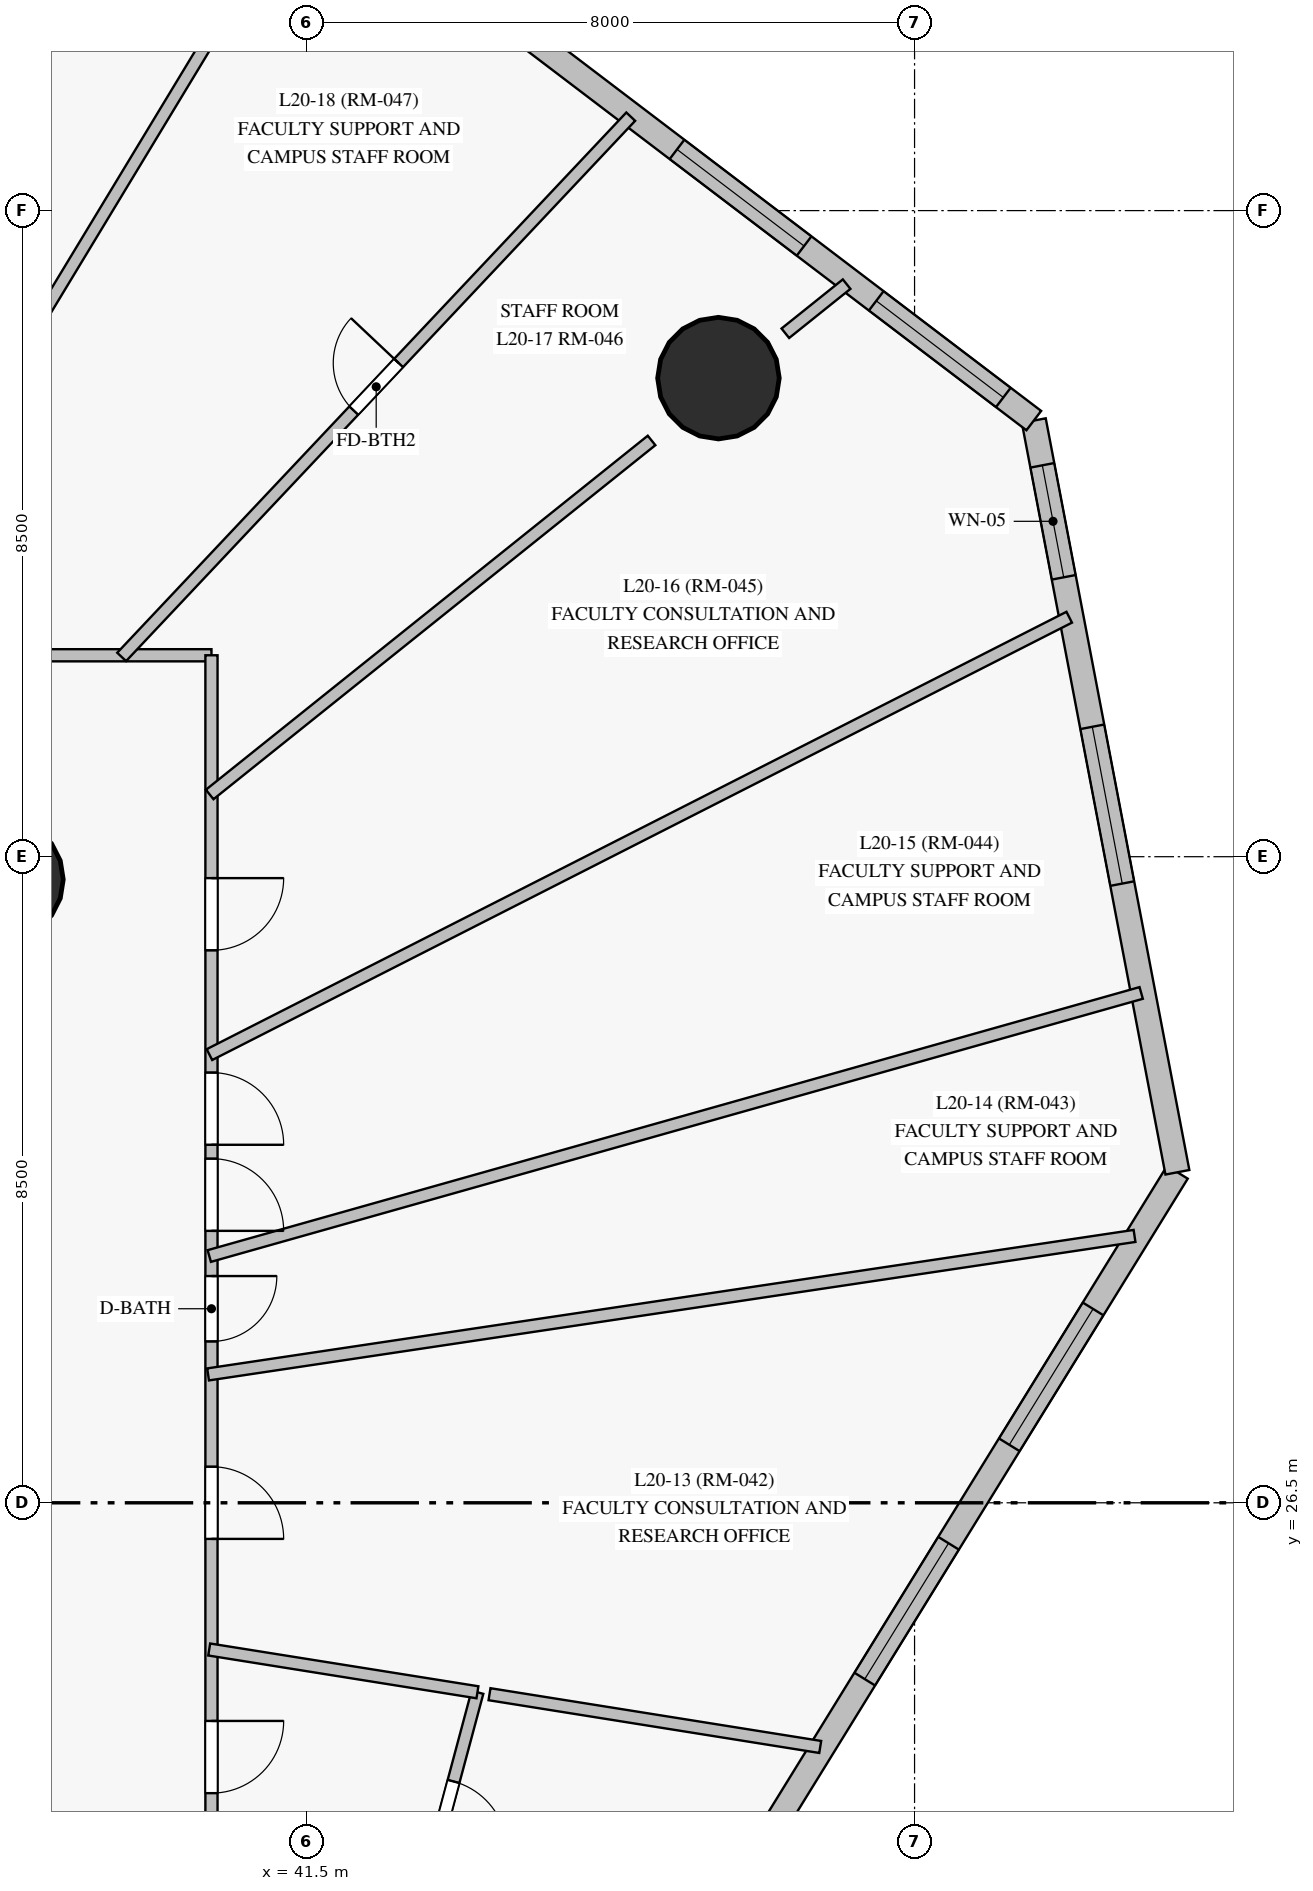
"""IFC4 building model, lengths in metres.
Left out: names, types, materials, properties, quantities, classifications, styles, units other than length and angle.
Written with IfcOpenShell. Run it as: python <this file> out.ifc"""

import sys

from ifc_helpers import new_model, si_unit, direction, frame, frame_2d, origin, origin_with_axes, origin_2d, place, context, subcontext, project, spatial, rectangle, circle, extrude, source, transform, mapped, element, fill, save


model = new_model("IFC4")
c1 = context("Model", 3, precision=1e-05, world=origin(), true_north=direction((0.0, 1.0)))
c2 = subcontext(c1, "Body", "Model", "MODEL_VIEW")
j1 = project(units=[si_unit("LENGTHUNIT", "METRE"), si_unit("PLANEANGLEUNIT", "RADIAN")], contexts=[c1])
p1 = place(None, origin())
s1 = spatial("IfcSite", under=j1, at=p1, CompositionType="ELEMENT")
p2 = place(p1, origin())
s2 = spatial("IfcBuilding", under=s1, at=p2, CompositionType="ELEMENT")
p3 = place(p2, frame((0.0, 0.0, 76.9)))
s3 = spatial("IfcBuildingStorey", under=s2, at=p3, CompositionType="ELEMENT", Elevation=76.9)
m1 = source(origin_with_axes(), c2, "Body", "SweptSolid", [
    extrude(circle(Radius=0.8, at=origin_2d()), origin(), (0.0, 0.0, 1.0), 3.6),
])
for number, where, z_axis, x_axis in (
    (1, (37.5, 34.7, 0.0), (0.0, 0.0, 1.0), (1.0, 0.0, 0.0)),
    (2, (46.92, 41.296, 0.0), (0.0, 0.0, 1.0), (1.0, 0.0, 0.0)),
):
    element("IfcColumn", number, at=place(p3, frame(where, z_axis=z_axis, x_axis=x_axis)), inside=s3, PredefinedType="COLUMN", context=c2, shape_type="MappedRepresentation", body=[
        mapped(m1, transform((0.0, 0.0, 0.0), scale=1.0)),
    ])
p4 = place(p3, frame((45.043, 18.018, 0.0), z_axis=(0.0, 0.0, 1.0), x_axis=(0.525018733496, 0.851090670539, 0.0)))
e3 = element("IfcWall", 3, at=p4, inside=s3, PredefinedType="SOLIDWALL", context=c2, shape_type="SweptSolid", body=[
    extrude(rectangle(XDim=15.076, YDim=0.32, at=frame_2d((7.538, 0.0))), origin(), (0.0, 0.0, 1.0), 3.35),
])
p5 = place(p4, frame((2.06, 0.0, 0.85)))
e4 = element("IfcOpeningElement", 4, at=p5, cuts=e3, PredefinedType="OPENING", context=c2, shape_type="SweptSolid", body=[
    extrude(rectangle(XDim=2.1, YDim=1.95, at=frame_2d((1.05, 0.975))), frame((0.0, 0.17, 0.0), z_axis=(0.0, -1.0, 0.0), x_axis=(1.0, 0.0, 0.0)), (0.0, 0.0, 1.0), 0.34),
])
p6 = place(p4, frame((7.241, 0.0, 0.85)))
e5 = element("IfcOpeningElement", 5, at=p6, cuts=e3, PredefinedType="OPENING", context=c2, shape_type="SweptSolid", body=[
    extrude(rectangle(XDim=2.1, YDim=1.95, at=frame_2d((1.05, 0.975))), frame((0.0, 0.17, 0.0), z_axis=(0.0, -1.0, 0.0), x_axis=(1.0, 0.0, 0.0)), (0.0, 0.0, 1.0), 0.34),
])
p7 = place(p4, frame((10.863, 0.0, 0.85)))
e6 = element("IfcOpeningElement", 6, at=p7, cuts=e3, PredefinedType="OPENING", context=c2, shape_type="SweptSolid", body=[
    extrude(rectangle(XDim=2.1, YDim=1.95, at=frame_2d((1.05, 0.975))), frame((0.0, 0.17, 0.0), z_axis=(0.0, -1.0, 0.0), x_axis=(1.0, 0.0, 0.0)), (0.0, 0.0, 1.0), 0.34),
])
p8 = place(p3, frame((52.958, 30.848, 0.0), z_axis=(0.0, 0.0, 1.0), x_axis=(-0.187668122097, 0.982232495873, 0.0)))
e7 = element("IfcWall", 7, at=p8, inside=s3, PredefinedType="SOLIDWALL", context=c2, shape_type="SweptSolid", body=[
    extrude(rectangle(XDim=10.068, YDim=0.32, at=frame_2d((5.034, 0.0))), origin(), (0.0, 0.0, 1.0), 3.35),
])
p9 = place(p8, frame((3.867, 0.0, 0.85)))
e8 = element("IfcOpeningElement", 8, at=p9, cuts=e7, PredefinedType="OPENING", context=c2, shape_type="SweptSolid", body=[
    extrude(rectangle(XDim=2.1, YDim=1.95, at=frame_2d((1.05, 0.975))), frame((0.0, 0.17, 0.0), z_axis=(0.0, -1.0, 0.0), x_axis=(1.0, 0.0, 0.0)), (0.0, 0.0, 1.0), 0.34),
])
p10 = place(p8, frame((7.969, 0.0, 0.85)))
e9 = element("IfcOpeningElement", 9, at=p10, cuts=e7, PredefinedType="OPENING", context=c2, shape_type="SweptSolid", body=[
    extrude(rectangle(XDim=1.5, YDim=1.85, at=frame_2d((0.75, 0.925))), frame((0.0, 0.17, 0.0), z_axis=(0.0, -1.0, 0.0), x_axis=(1.0, 0.0, 0.0)), (0.0, 0.0, 1.0), 0.34),
])
p11 = place(p3, frame((51.069, 40.737, 0.0), z_axis=(0.0, 0.0, 1.0), x_axis=(-0.796119452113, 0.605139502898, 0.0)))
e10 = element("IfcWall", 10, at=p11, inside=s3, PredefinedType="SOLIDWALL", context=c2, shape_type="SweptSolid", body=[
    extrude(rectangle(XDim=12.548, YDim=0.32, at=frame_2d((6.274, 0.0))), origin(), (0.0, 0.0, 1.0), 3.35),
])
p12 = place(p11, frame((0.503, 0.0, 0.85)))
e11 = element("IfcOpeningElement", 11, at=p12, cuts=e10, PredefinedType="OPENING", context=c2, shape_type="SweptSolid", body=[
    extrude(rectangle(XDim=2.1, YDim=1.95, at=frame_2d((1.05, 0.975))), frame((0.0, 0.17, 0.0), z_axis=(0.0, -1.0, 0.0), x_axis=(1.0, 0.0, 0.0)), (0.0, 0.0, 1.0), 0.34),
])
p13 = place(p11, frame((3.796, 0.0, 0.85)))
e12 = element("IfcOpeningElement", 12, at=p13, cuts=e10, PredefinedType="OPENING", context=c2, shape_type="SweptSolid", body=[
    extrude(rectangle(XDim=2.1, YDim=1.95, at=frame_2d((1.05, 0.975))), frame((0.0, 0.17, 0.0), z_axis=(0.0, -1.0, 0.0), x_axis=(1.0, 0.0, 0.0)), (0.0, 0.0, 1.0), 0.34),
])
p14 = place(p11, frame((8.241, 0.0, 0.85)))
e13 = element("IfcOpeningElement", 13, at=p14, cuts=e10, PredefinedType="OPENING", context=c2, shape_type="SweptSolid", body=[
    extrude(rectangle(XDim=2.1, YDim=1.95, at=frame_2d((1.05, 0.975))), frame((0.0, 0.17, 0.0), z_axis=(0.0, -1.0, 0.0), x_axis=(1.0, 0.0, 0.0)), (0.0, 0.0, 1.0), 0.34),
])
p15 = place(p3, frame((10.5, 37.65, 0.0), z_axis=(0.0, 0.0, 1.0), x_axis=(1.0, 0.0, 0.0)))
e14 = element("IfcWall", 14, at=p15, inside=s3, PredefinedType="PARTITIONING", context=c2, shape_type="SweptSolid", body=[
    extrude(rectangle(XDim=29.75, YDim=0.16, at=frame_2d((14.875, 0.0))), origin(), (0.0, 0.0, 1.0), 2.75),
])
p16 = place(p15, frame((26.208, 0.0, 0.0)))
e15 = element("IfcOpeningElement", 15, at=p16, cuts=e14, PredefinedType="OPENING", context=c2, shape_type="SweptSolid", body=[
    extrude(rectangle(XDim=0.95, YDim=2.15, at=frame_2d((0.475, 1.075))), frame((0.0, 0.09, 0.0), z_axis=(0.0, -1.0, 0.0), x_axis=(1.0, 0.0, 0.0)), (0.0, 0.0, 1.0), 0.18),
])
p17 = place(p15, frame((23.495, 0.0, 0.0)))
e16 = element("IfcOpeningElement", 16, at=p17, cuts=e14, PredefinedType="OPENING", context=c2, shape_type="SweptSolid", body=[
    extrude(rectangle(XDim=0.95, YDim=2.15, at=frame_2d((0.475, 1.075))), frame((0.0, 0.09, 0.0), z_axis=(0.0, -1.0, 0.0), x_axis=(1.0, 0.0, 0.0)), (0.0, 0.0, 1.0), 0.18),
])
p18 = place(p15, frame((14.4, 0.0, 0.0)))
e17 = element("IfcOpeningElement", 17, at=p18, cuts=e14, PredefinedType="OPENING", context=c2, shape_type="SweptSolid", body=[
    extrude(rectangle(XDim=0.95, YDim=2.15, at=frame_2d((0.475, 1.075))), frame((0.0, 0.09, 0.0), z_axis=(0.0, -1.0, 0.0), x_axis=(1.0, 0.0, 0.0)), (0.0, 0.0, 1.0), 0.18),
])
p19 = place(p15, frame((9.938, 0.0, 0.0)))
e18 = element("IfcOpeningElement", 18, at=p19, cuts=e14, PredefinedType="OPENING", context=c2, shape_type="SweptSolid", body=[
    extrude(rectangle(XDim=0.95, YDim=2.15, at=frame_2d((0.475, 1.075))), frame((0.0, 0.09, 0.0), z_axis=(0.0, -1.0, 0.0), x_axis=(1.0, 0.0, 0.0)), (0.0, 0.0, 1.0), 0.18),
])
p20 = place(p15, frame((6.962, 0.0, 0.0)))
e19 = element("IfcOpeningElement", 19, at=p20, cuts=e14, PredefinedType="OPENING", context=c2, shape_type="SweptSolid", body=[
    extrude(rectangle(XDim=0.95, YDim=2.15, at=frame_2d((0.475, 1.075))), frame((0.0, 0.09, 0.0), z_axis=(0.0, -1.0, 0.0), x_axis=(1.0, 0.0, 0.0)), (0.0, 0.0, 1.0), 0.18),
])
p21 = place(p3, frame((40.25, 37.65, 0.0), z_axis=(0.0, 0.0, 1.0), x_axis=(0.0, -1.0, 0.0)))
e20 = element("IfcWall", 20, at=p21, inside=s3, PredefinedType="PARTITIONING", context=c2, shape_type="SweptSolid", body=[
    extrude(rectangle(XDim=22.3, YDim=0.16, at=frame_2d((11.15, 0.0))), origin(), (0.0, 0.0, 1.0), 2.75),
])
p22 = place(p21, frame((14.02, 0.0, 0.0)))
e21 = element("IfcOpeningElement", 21, at=p22, cuts=e20, PredefinedType="OPENING", context=c2, shape_type="SweptSolid", body=[
    extrude(rectangle(XDim=0.95, YDim=2.15, at=frame_2d((0.475, 1.075))), frame((0.0, 0.09, 0.0), z_axis=(0.0, -1.0, 0.0), x_axis=(1.0, 0.0, 0.0)), (0.0, 0.0, 1.0), 0.18),
])
p23 = place(p21, frame((10.675, 0.0, 0.0)))
e22 = element("IfcOpeningElement", 22, at=p23, cuts=e20, PredefinedType="OPENING", context=c2, shape_type="SweptSolid", body=[
    extrude(rectangle(XDim=0.95, YDim=2.15, at=frame_2d((0.475, 1.075))), frame((0.0, 0.09, 0.0), z_axis=(0.0, -1.0, 0.0), x_axis=(1.0, 0.0, 0.0)), (0.0, 0.0, 1.0), 0.18),
])
p24 = place(p21, frame((8.167, 0.0, 0.0)))
e23 = element("IfcOpeningElement", 23, at=p24, cuts=e20, PredefinedType="OPENING", context=c2, shape_type="SweptSolid", body=[
    extrude(rectangle(XDim=0.86, YDim=2.1, at=frame_2d((0.43, 1.05))), frame((0.0, 0.09, 0.0), z_axis=(0.0, -1.0, 0.0), x_axis=(1.0, 0.0, 0.0)), (0.0, 0.0, 1.0), 0.18),
])
p25 = place(p21, frame((5.49, 0.0, 0.0)))
e24 = element("IfcOpeningElement", 24, at=p25, cuts=e20, PredefinedType="OPENING", context=c2, shape_type="SweptSolid", body=[
    extrude(rectangle(XDim=0.95, YDim=2.15, at=frame_2d((0.475, 1.075))), frame((0.0, 0.09, 0.0), z_axis=(0.0, -1.0, 0.0), x_axis=(1.0, 0.0, 0.0)), (0.0, 0.0, 1.0), 0.18),
])
p26 = place(p21, frame((2.932, 0.0, 0.0)))
e25 = element("IfcOpeningElement", 25, at=p26, cuts=e20, PredefinedType="OPENING", context=c2, shape_type="SweptSolid", body=[
    extrude(rectangle(XDim=0.95, YDim=2.15, at=frame_2d((0.475, 1.075))), frame((0.0, 0.09, 0.0), z_axis=(0.0, -1.0, 0.0), x_axis=(1.0, 0.0, 0.0)), (0.0, 0.0, 1.0), 0.18),
])
p27 = place(p21, frame((6.622, 0.0, 0.0)))
e26 = element("IfcOpeningElement", 26, at=p27, cuts=e20, PredefinedType="OPENING", context=c2, shape_type="SweptSolid", body=[
    extrude(rectangle(XDim=0.95, YDim=2.15, at=frame_2d((0.475, 1.075))), frame((0.0, 0.09, 0.0), z_axis=(0.0, -1.0, 0.0), x_axis=(1.0, 0.0, 0.0)), (0.0, 0.0, 1.0), 0.18),
])
p28 = place(p3, frame((40.221, 29.747, 0.0), z_axis=(0.0, 0.0, 1.0), x_axis=(0.962391240029, 0.271667261766, 0.0)))
e27 = element("IfcWall", 27, at=p28, inside=s3, PredefinedType="PARTITIONING", context=c2, shape_type="SweptSolid", body=[
    extrude(rectangle(XDim=12.74, YDim=0.16, at=frame_2d((6.37, 0.0))), origin(), (0.0, 0.0, 1.0), 3.35),
])
p29 = place(p3, frame((40.223, 32.396, 0.0), z_axis=(0.0, 0.0, 1.0), x_axis=(0.891304627561, 0.453404963459, 0.0)))
e28 = element("IfcWall", 28, at=p29, inside=s3, PredefinedType="PARTITIONING", context=c2, shape_type="SweptSolid", body=[
    extrude(rectangle(XDim=12.691, YDim=0.16, at=frame_2d((6.345, 0.0))), origin(), (0.0, 0.0, 1.0), 3.35),
])
p30 = place(p3, frame((40.206, 28.189, 0.0), z_axis=(0.0, 0.0, 1.0), x_axis=(0.989013522668, 0.147825072233, 0.0)))
e29 = element("IfcWall", 29, at=p30, inside=s3, PredefinedType="PARTITIONING", context=c2, shape_type="SweptSolid", body=[
    extrude(rectangle(XDim=12.324, YDim=0.16, at=frame_2d((6.162, 0.0))), origin(), (0.0, 0.0, 1.0), 3.35),
])
p31 = place(p3, frame((33.586, 37.623, 0.0), z_axis=(0.0, 0.0, 1.0), x_axis=(0.411385577094, 0.911461412765, 0.0)))
e30 = element("IfcWall", 30, at=p31, inside=s3, PredefinedType="PARTITIONING", context=c2, shape_type="SweptSolid", body=[
    extrude(rectangle(XDim=12.098, YDim=0.16, at=frame_2d((6.049, 0.0))), origin(), (0.0, 0.0, 1.0), 3.35),
])
p32 = place(p31, frame((5.557, 0.0, 0.0)))
e31 = element("IfcOpeningElement", 31, at=p32, cuts=e30, PredefinedType="OPENING", context=c2, shape_type="SweptSolid", body=[
    extrude(rectangle(XDim=0.95, YDim=2.15, at=frame_2d((0.475, 1.075))), frame((0.0, 0.09, 0.0), z_axis=(0.0, -1.0, 0.0), x_axis=(1.0, 0.0, 0.0)), (0.0, 0.0, 1.0), 0.18),
])
p33 = place(p3, frame((35.302, 37.624, 0.0), z_axis=(0.0, 0.0, 1.0), x_axis=(0.517751606505, 0.855530989481, 0.0)))
e32 = element("IfcWall", 32, at=p33, inside=s3, PredefinedType="PARTITIONING", context=c2, shape_type="SweptSolid", body=[
    extrude(rectangle(XDim=12.061, YDim=0.16, at=frame_2d((6.031, 0.0))), origin(), (0.0, 0.0, 1.0), 3.35),
])
p34 = place(p3, frame((39.068, 37.628, 0.0), z_axis=(0.0, 0.0, 1.0), x_axis=(0.685796563099, 0.727793290737, 0.0)))
e33 = element("IfcWall", 33, at=p34, inside=s3, PredefinedType="PARTITIONING", context=c2, shape_type="SweptSolid", body=[
    extrude(rectangle(XDim=9.766, YDim=0.16, at=frame_2d((4.883, 0.0))), origin(), (0.0, 0.0, 1.0), 3.35),
])
p35 = place(p34, frame((4.453, 0.0, 0.0)))
e34 = element("IfcOpeningElement", 34, at=p35, cuts=e33, PredefinedType="OPENING", context=c2, shape_type="SweptSolid", body=[
    extrude(rectangle(XDim=0.86, YDim=2.04, at=frame_2d((0.43, 1.02))), frame((0.0, 0.09, 0.0), z_axis=(0.0, -1.0, 0.0), x_axis=(1.0, 0.0, 0.0)), (0.0, 0.0, 1.0), 0.18),
])
p36 = place(p3, frame((40.227, 35.818, 0.0), z_axis=(0.0, 0.0, 1.0), x_axis=(0.780414563341, 0.625262432363, 0.0)))
e35 = element("IfcWall", 35, at=p36, inside=s3, PredefinedType="PARTITIONING", context=c2, shape_type="SweptSolid", body=[
    extrude(rectangle(XDim=7.449, YDim=0.16, at=frame_2d((3.725, 0.0))), origin(), (0.0, 0.0, 1.0), 2.7),
])
p37 = place(p3, frame((43.749, 24.007, 0.0), z_axis=(0.0, 0.0, 1.0), x_axis=(-0.258836010218, -0.96592128034, 0.0)))
e36 = element("IfcWall", 36, at=p37, inside=s3, PredefinedType="PARTITIONING", context=c2, shape_type="SweptSolid", body=[
    extrude(rectangle(XDim=5.658, YDim=0.16, at=frame_2d((2.829, 0.0))), origin(), (0.0, 0.0, 1.0), 2.75),
])
p38 = place(p37, frame((1.214, 0.0, 0.0)))
e37 = element("IfcOpeningElement", 37, at=p38, cuts=e36, PredefinedType="OPENING", context=c2, shape_type="SweptSolid", body=[
    extrude(rectangle(XDim=0.95, YDim=2.15, at=frame_2d((0.475, 1.075))), frame((0.0, 0.09, 0.0), z_axis=(0.0, -1.0, 0.0), x_axis=(1.0, 0.0, 0.0)), (0.0, 0.0, 1.0), 0.18),
])
p39 = place(p3, frame((43.908, 23.982, 0.0), z_axis=(0.0, 0.0, 1.0), x_axis=(0.98751279875, -0.157538796187, 0.0)))
e38 = element("IfcWall", 38, at=p39, inside=s3, PredefinedType="PARTITIONING", context=c2, shape_type="SweptSolid", body=[
    extrude(rectangle(XDim=4.406, YDim=0.16, at=frame_2d((2.203, 0.0))), origin(), (0.0, 0.0, 1.0), 3.35),
])
p40 = place(p3, frame((40.22, 24.57, 0.0), z_axis=(0.0, 0.0, 1.0), x_axis=(0.98751130527, -0.1575481576, 0.0)))
e39 = element("IfcWall", 39, at=p40, inside=s3, PredefinedType="PARTITIONING", context=c2, shape_type="SweptSolid", body=[
    extrude(rectangle(XDim=3.573, YDim=0.16, at=frame_2d((1.787, 0.0))), origin(), (0.0, 0.0, 1.0), 3.35),
])
p41 = place(p3, frame((47.8, 41.886, 0.0), z_axis=(0.0, 0.0, 1.0), x_axis=(0.780338403161, 0.625357479009, 0.0)))
e40 = element("IfcWall", 40, at=p41, inside=s3, PredefinedType="PARTITIONING", context=c2, shape_type="SweptSolid", body=[
    extrude(rectangle(XDim=1.033, YDim=0.16, at=frame_2d((0.517, 0.0))), origin(), (0.0, 0.0, 1.0), 3.35),
])
m2 = source(origin_with_axes(), c2, "Body", "SweptSolid", [
    extrude(rectangle(XDim=2.1, YDim=1.95, at=frame_2d((1.05, 0.975))), frame((0.0, 0.03, 0.0), z_axis=(0.0, -1.0, 0.0), x_axis=(1.0, 0.0, 0.0)), (0.0, 0.0, 1.0), 0.06),
])
p42 = place(p6, origin())
e41 = element("IfcWindow", 41, at=p42, inside=s3, PartitioningType="SINGLE_PANEL", PredefinedType="WINDOW", context=c2, shape_type="MappedRepresentation", body=[
    mapped(m2, transform((0.0, 0.0, 0.0), scale=1.0)),
])
fill(e5, e41)
p43 = place(p7, origin())
e42 = element("IfcWindow", 42, at=p43, inside=s3, PartitioningType="SINGLE_PANEL", PredefinedType="WINDOW", context=c2, shape_type="MappedRepresentation", body=[
    mapped(m2, transform((0.0, 0.0, 0.0), scale=1.0)),
])
fill(e6, e42)
p44 = place(p9, origin())
e43 = element("IfcWindow", 43, at=p44, inside=s3, PartitioningType="SINGLE_PANEL", PredefinedType="WINDOW", context=c2, shape_type="MappedRepresentation", body=[
    mapped(m2, transform((0.0, 0.0, 0.0), scale=1.0)),
])
fill(e8, e43)
m3 = source(origin_with_axes(), c2, "Body", "SweptSolid", [
    extrude(rectangle(XDim=1.5, YDim=1.85, at=frame_2d((0.75, 0.925))), frame((0.0, 0.03, 0.0), z_axis=(0.0, -1.0, 0.0), x_axis=(1.0, 0.0, 0.0)), (0.0, 0.0, 1.0), 0.06),
])
p45 = place(p10, origin())
e44 = element("IfcWindow", 44, at=p45, inside=s3, PartitioningType="SINGLE_PANEL", PredefinedType="WINDOW", context=c2, shape_type="MappedRepresentation", body=[
    mapped(m3, transform((0.0, 0.0, 0.0), scale=1.0)),
])
fill(e9, e44)
p46 = place(p12, origin())
e45 = element("IfcWindow", 45, at=p46, inside=s3, PartitioningType="SINGLE_PANEL", PredefinedType="WINDOW", context=c2, shape_type="MappedRepresentation", body=[
    mapped(m2, transform((0.0, 0.0, 0.0), scale=1.0)),
])
fill(e11, e45)
p47 = place(p13, origin())
e46 = element("IfcWindow", 46, at=p47, inside=s3, PartitioningType="SINGLE_PANEL", PredefinedType="WINDOW", context=c2, shape_type="MappedRepresentation", body=[
    mapped(m2, transform((0.0, 0.0, 0.0), scale=1.0)),
])
fill(e12, e46)
m4 = source(origin_with_axes(), c2, "Body", "SweptSolid", [
    extrude(rectangle(XDim=0.95, YDim=2.15, at=frame_2d((0.475, 1.075))), frame((0.0, 0.025, 0.0), z_axis=(0.0, -1.0, 0.0), x_axis=(1.0, 0.0, 0.0)), (0.0, 0.0, 1.0), 0.05),
])
p48 = place(p22, origin())
e47 = element("IfcDoor", 47, at=p48, inside=s3, OperationType="SINGLE_SWING_LEFT", PredefinedType="DOOR", context=c2, shape_type="MappedRepresentation", body=[
    mapped(m4, transform((0.0, 0.0, 0.0), scale=1.0)),
])
fill(e21, e47)
p49 = place(p23, origin())
e48 = element("IfcDoor", 48, at=p49, inside=s3, OperationType="SINGLE_SWING_RIGHT", PredefinedType="DOOR", context=c2, shape_type="MappedRepresentation", body=[
    mapped(m4, transform((0.0, 0.0, 0.0), scale=1.0)),
])
fill(e22, e48)
m5 = source(origin_with_axes(), c2, "Body", "SweptSolid", [
    extrude(rectangle(XDim=0.86, YDim=2.1, at=frame_2d((0.43, 1.05))), frame((0.0, 0.025, 0.0), z_axis=(0.0, -1.0, 0.0), x_axis=(1.0, 0.0, 0.0)), (0.0, 0.0, 1.0), 0.05),
])
p50 = place(p24, origin())
e49 = element("IfcDoor", 49, at=p50, inside=s3, OperationType="SINGLE_SWING_LEFT", PredefinedType="DOOR", context=c2, shape_type="MappedRepresentation", body=[
    mapped(m5, transform((0.0, 0.0, 0.0), scale=1.0)),
])
fill(e23, e49)
p51 = place(p25, origin())
e50 = element("IfcDoor", 50, at=p51, inside=s3, OperationType="SINGLE_SWING_RIGHT", PredefinedType="DOOR", context=c2, shape_type="MappedRepresentation", body=[
    mapped(m4, transform((0.0, 0.0, 0.0), scale=1.0)),
])
fill(e24, e50)
p52 = place(p26, origin())
e51 = element("IfcDoor", 51, at=p52, inside=s3, OperationType="SINGLE_SWING_LEFT", PredefinedType="DOOR", context=c2, shape_type="MappedRepresentation", body=[
    mapped(m4, transform((0.0, 0.0, 0.0), scale=1.0)),
])
fill(e25, e51)
p53 = place(p27, origin())
e52 = element("IfcDoor", 52, at=p53, inside=s3, OperationType="SINGLE_SWING_RIGHT", PredefinedType="DOOR", context=c2, shape_type="MappedRepresentation", body=[
    mapped(m4, transform((0.0, 0.0, 0.0), scale=1.0)),
])
fill(e26, e52)
p54 = place(p38, origin())
e53 = element("IfcDoor", 53, at=p54, inside=s3, OperationType="SINGLE_SWING_RIGHT", PredefinedType="DOOR", context=c2, shape_type="MappedRepresentation", body=[
    mapped(m4, transform((0.0, 0.0, 0.0), scale=1.0)),
])
fill(e37, e53)
m6 = source(origin_with_axes(), c2, "Body", "SweptSolid", [
    extrude(rectangle(XDim=0.86, YDim=2.04, at=frame_2d((0.43, 1.02))), frame((0.0, 0.025, 0.0), z_axis=(0.0, -1.0, 0.0), x_axis=(1.0, 0.0, 0.0)), (0.0, 0.0, 1.0), 0.05),
])
p55 = place(p35, origin())
e54 = element("IfcDoor", 54, at=p55, inside=s3, OperationType="SINGLE_SWING_RIGHT", PredefinedType="DOOR", context=c2, shape_type="MappedRepresentation", body=[
    mapped(m6, transform((0.0, 0.0, 0.0), scale=1.0)),
])
fill(e34, e54)
save(model, sys.argv[1])
